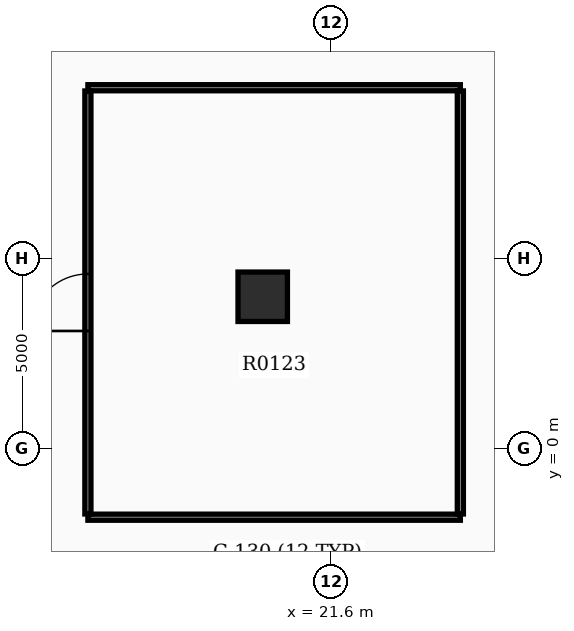
"""IFC4 building model, lengths in metres.
Left out: names, types, materials, properties, quantities, classifications, styles, units other than length and angle.
Written with IfcOpenShell. Run it as: python <this file> out.ifc"""

import sys

from ifc_helpers import new_model, si_unit, direction, frame, frame_2d, origin, origin_2d, place, context, subcontext, project, spatial, rectangle, extrude, element, fill, save


model = new_model("IFC4")
c1 = context("Model", 3, precision=1e-05, world=origin(), true_north=direction((0.0, 1.0)))
c2 = subcontext(c1, "Body", "Model", "MODEL_VIEW")
j1 = project(units=[si_unit("LENGTHUNIT", "METRE"), si_unit("PLANEANGLEUNIT", "RADIAN")], contexts=[c1])
p1 = place(None, origin())
s1 = spatial("IfcSite", under=j1, at=p1, CompositionType="ELEMENT")
p2 = place(p1, origin())
s2 = spatial("IfcBuilding", under=s1, at=p2, CompositionType="ELEMENT")
p3 = place(p2, origin())
s3 = spatial("IfcBuildingStorey", under=s2, at=p3, CompositionType="ELEMENT", Elevation=0.0)
p4 = place(p3, frame((19.8, 4.0, 0.0), z_axis=(0.0, 0.0, 1.0), x_axis=(1.0, 0.0, 0.0)))
e1 = element("IfcColumn", 1, at=p4, inside=s3, PredefinedType="COLUMN", context=c2, shape_type="SweptSolid", body=[
    extrude(rectangle(XDim=1.3, YDim=1.3, at=origin_2d()), origin(), (0.0, 0.0, 1.0), 5.4),
])
for number, where, z_axis, x_axis in (
    (2, (15.2, -1.8, 0.0), (0.0, 0.0, 1.0), (1.0, 0.0, 0.0)),
    (3, (15.2, 9.5, 0.0), (0.0, 0.0, 1.0), (1.0, 0.0, 0.0)),
):
    element("IfcWall", number, at=place(p3, frame(where, z_axis=z_axis, x_axis=x_axis)), inside=s3, PredefinedType="PARTITIONING", context=c2, shape_type="SweptSolid", body=[
        extrude(rectangle(XDim=9.8, YDim=0.16, at=frame_2d((4.9, 0.0))), origin(), (0.0, 0.0, 1.0), 2.67),
    ])
p5 = place(p3, frame((15.2, -1.715, 0.0), z_axis=(0.0, 0.0, 1.0), x_axis=(0.0, 1.0, 0.0)))
e4 = element("IfcWall", 4, at=p5, inside=s3, PredefinedType="PARTITIONING", context=c2, shape_type="SweptSolid", body=[
    extrude(rectangle(XDim=11.13, YDim=0.16, at=frame_2d((5.565, 0.0))), origin(), (0.0, 0.0, 1.0), 2.67),
])
p6 = place(p5, frame((4.815, 0.0, 0.0)))
e5 = element("IfcOpeningElement", 5, at=p6, cuts=e4, PredefinedType="OPENING", context=c2, shape_type="SweptSolid", body=[
    extrude(rectangle(XDim=1.5, YDim=2.15, at=frame_2d((0.75, 1.075))), frame((0.0, 0.09, 0.0), z_axis=(0.0, -1.0, 0.0), x_axis=(1.0, 0.0, 0.0)), (0.0, 0.0, 1.0), 0.18),
])
p7 = place(p3, frame((25.0, -1.715, 0.0), z_axis=(0.0, 0.0, 1.0), x_axis=(0.0, 1.0, 0.0)))
e6 = element("IfcWall", 6, at=p7, inside=s3, PredefinedType="PARTITIONING", context=c2, shape_type="SweptSolid", body=[
    extrude(rectangle(XDim=11.13, YDim=0.16, at=frame_2d((5.565, 0.0))), origin(), (0.0, 0.0, 1.0), 2.67),
])
p8 = place(p6, origin())
e7 = element("IfcDoor", 7, at=p8, inside=s3, OperationType="DOUBLE_DOOR_SINGLE_SWING", PredefinedType="DOOR", context=c2, shape_type="SweptSolid", body=[
    extrude(rectangle(XDim=1.5, YDim=2.15, at=frame_2d((0.75, 1.075))), frame((0.0, 0.025, 0.0), z_axis=(0.0, -1.0, 0.0), x_axis=(1.0, 0.0, 0.0)), (0.0, 0.0, 1.0), 0.05),
])
fill(e5, e7)
save(model, sys.argv[1])
